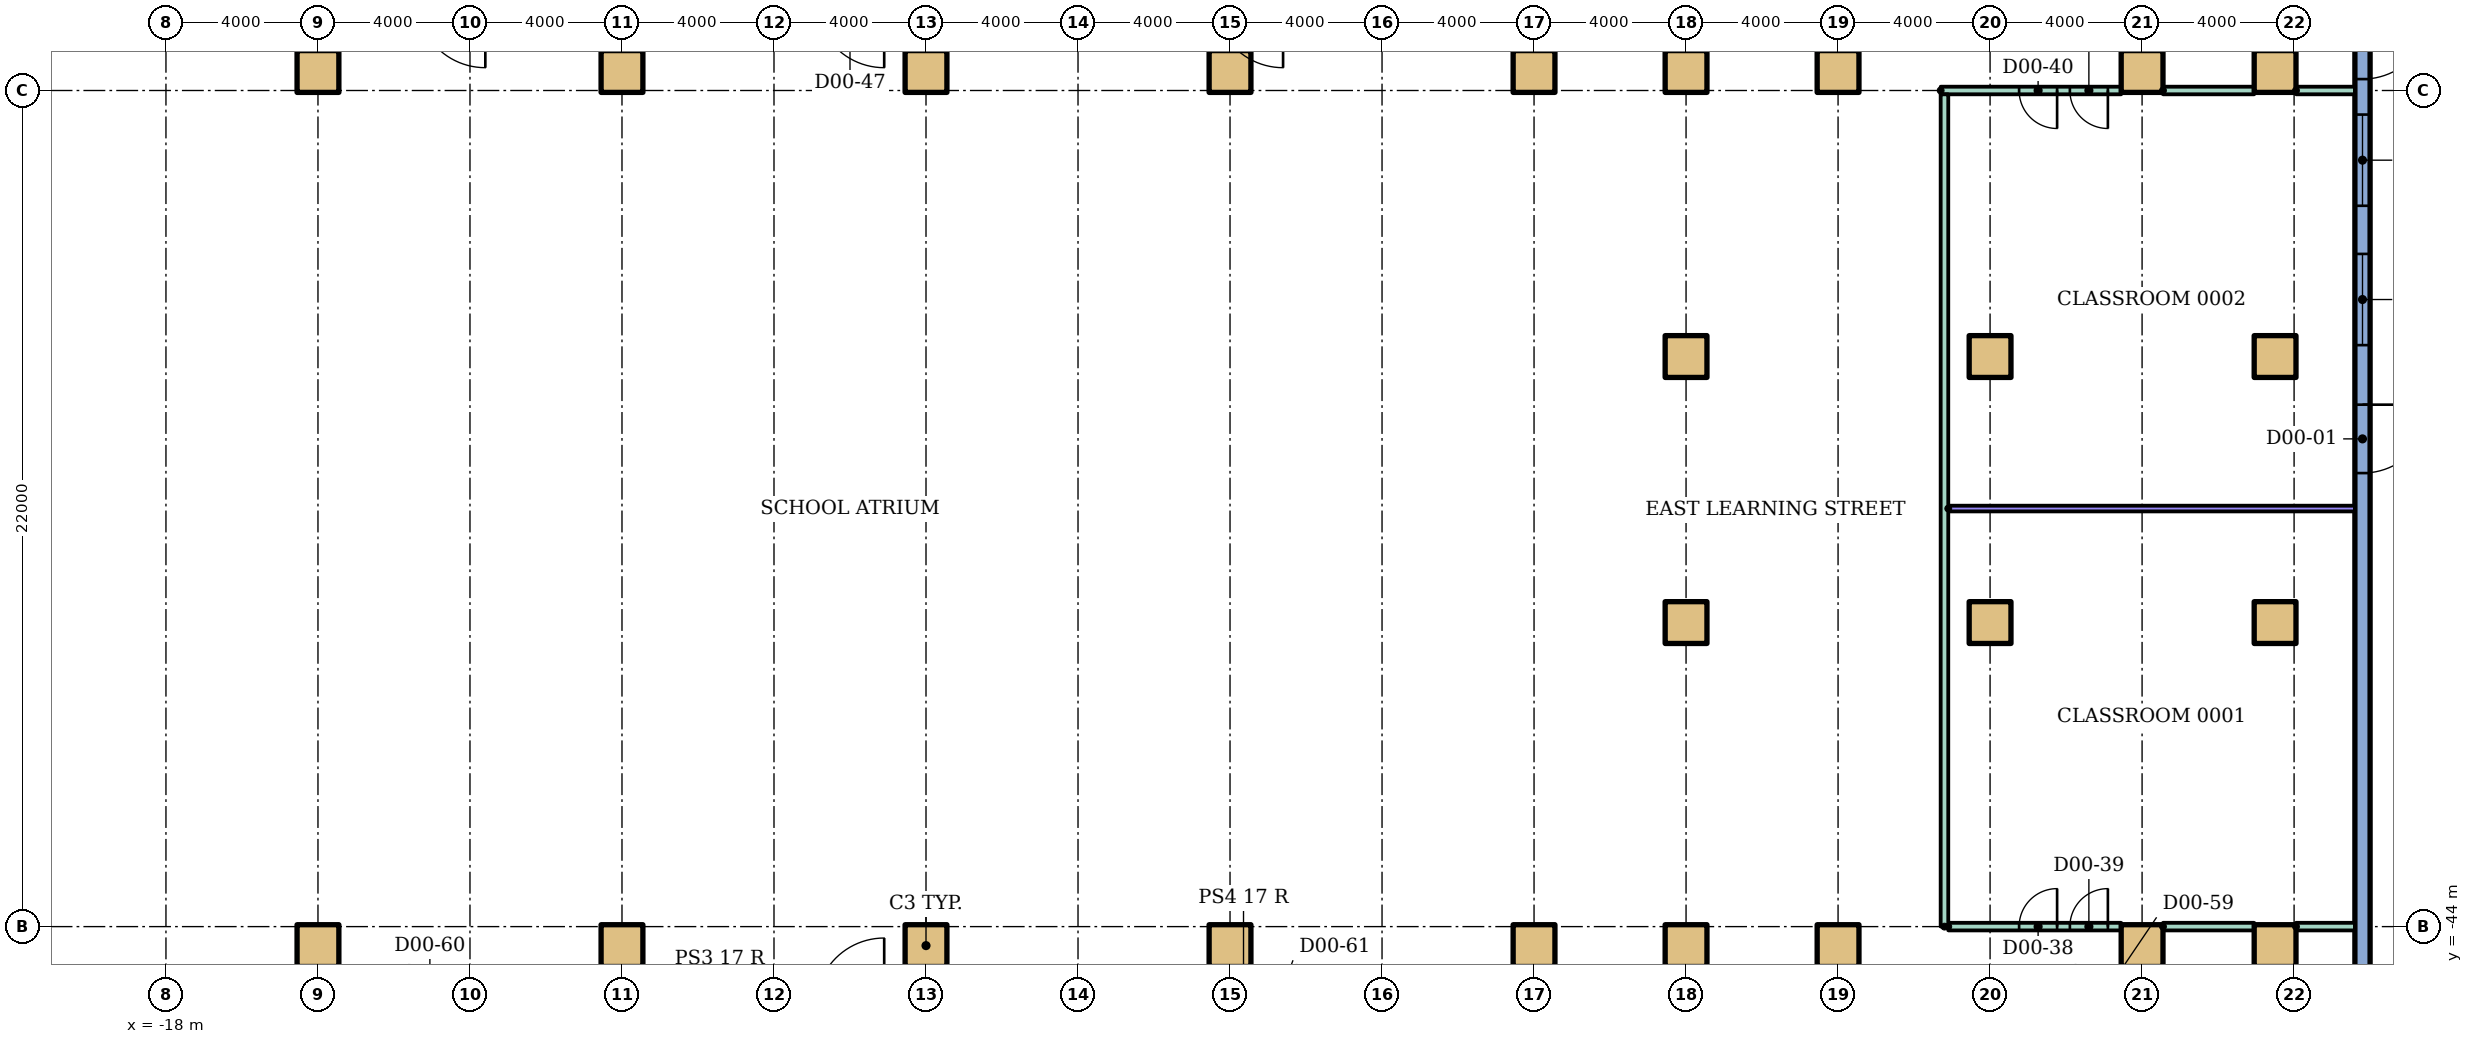
"""IFC4 building model, lengths in metres.
Left out: names, types, materials, properties, quantities, classifications, styles, units other than length and angle.
Written with IfcOpenShell. Run it as: python <this file> out.ifc"""

import sys

from ifc_helpers import new_model, si_unit, direction, frame, frame_2d, origin, origin_2d, place, context, subcontext, project, spatial, rectangle, extrude, element, fill, save


model = new_model("IFC4")
c1 = context("Model", 3, precision=1e-05, world=origin(), true_north=direction((0.0, 1.0)))
c2 = subcontext(c1, "Body", "Model", "MODEL_VIEW")
j1 = project(units=[si_unit("LENGTHUNIT", "METRE"), si_unit("PLANEANGLEUNIT", "RADIAN")], contexts=[c1])
p1 = place(None, origin())
s1 = spatial("IfcSite", under=j1, at=p1, CompositionType="ELEMENT")
p2 = place(p1, origin())
s2 = spatial("IfcBuilding", under=s1, at=p2, CompositionType="ELEMENT")
p3 = place(p2, origin())
s3 = spatial("IfcBuildingStorey", under=s2, at=p3, CompositionType="ELEMENT", Elevation=0.0)
for number, where in (
    (1, (-14.0, -44.5, 0.0)),
    (2, (-6.0, -44.5, 0.0)),
    (3, (2.0, -44.5, 0.0)),
    (4, (10.0, -44.5, 0.0)),
    (5, (18.0, -44.5, 0.0)),
    (6, (22.0, -44.5, 0.0)),
    (7, (26.0, -44.5, 0.0)),
    (8, (34.0, -44.5, 0.0)),
    (9, (37.5, -44.5, 0.0)),
    (10, (22.0, -36.0, 0.0)),
    (11, (30.0, -36.0, 0.0)),
    (12, (37.5, -36.0, 0.0)),
    (13, (22.0, -29.0, 0.0)),
    (14, (30.0, -29.0, 0.0)),
    (15, (37.5, -29.0, 0.0)),
    (16, (-14.0, -21.5, 0.0)),
    (17, (-6.0, -21.5, 0.0)),
    (18, (2.0, -21.5, 0.0)),
    (19, (10.0, -21.5, 0.0)),
    (20, (18.0, -21.5, 0.0)),
    (21, (22.0, -21.5, 0.0)),
    (22, (26.0, -21.5, 0.0)),
    (23, (34.0, -21.5, 0.0)),
    (24, (37.5, -21.5, 0.0)),
):
    element("IfcColumn", number, at=place(p3, frame(where)), inside=s3, PredefinedType="COLUMN", context=c2, shape_type="SweptSolid", body=[
        extrude(rectangle(XDim=1.1, YDim=1.1, at=origin_2d()), origin(), (0.0, 0.0, 1.0), 6.0),
    ])
p4 = place(p3, frame((39.8, -50.0, 0.0), z_axis=(0.0, 0.0, 1.0), x_axis=(0.0, 1.0, 0.0)))
e25 = element("IfcWall", 25, at=p4, inside=s3, PredefinedType="STANDARD", context=c2, shape_type="SweptSolid", body=[
    extrude(rectangle(XDim=70.0, YDim=0.4, at=frame_2d((35.0, 0.0))), origin(), (0.0, 0.0, 1.0), 5.7),
])
p5 = place(p4, frame((17.933, 0.0, 0.0)))
e26 = element("IfcOpeningElement", 26, at=p5, cuts=e25, PredefinedType="OPENING", context=c2, shape_type="SweptSolid", body=[
    extrude(rectangle(XDim=1.8, YDim=2.4, at=frame_2d((0.9, 1.2))), frame((0.0, 0.21, 0.0), z_axis=(0.0, -1.0, 0.0), x_axis=(1.0, 0.0, 0.0)), (0.0, 0.0, 1.0), 0.42),
])
p6 = place(p4, frame((0.75, 0.0, 0.9)))
e27 = element("IfcOpeningElement", 27, at=p6, cuts=e25, PredefinedType="OPENING", context=c2, shape_type="SweptSolid", body=[
    extrude(rectangle(XDim=2.4, YDim=2.4, at=frame_2d((1.2, 1.2))), frame((0.0, 0.21, 0.0), z_axis=(0.0, -1.0, 0.0), x_axis=(1.0, 0.0, 0.0)), (0.0, 0.0, 1.0), 0.42),
])
p7 = place(p4, frame((21.3, 0.0, 0.9)))
e28 = element("IfcOpeningElement", 28, at=p7, cuts=e25, PredefinedType="OPENING", context=c2, shape_type="SweptSolid", body=[
    extrude(rectangle(XDim=2.4, YDim=2.4, at=frame_2d((1.2, 1.2))), frame((0.0, 0.21, 0.0), z_axis=(0.0, -1.0, 0.0), x_axis=(1.0, 0.0, 0.0)), (0.0, 0.0, 1.0), 0.42),
])
p8 = place(p4, frame((24.967, 0.0, 0.9)))
e29 = element("IfcOpeningElement", 29, at=p8, cuts=e25, PredefinedType="OPENING", context=c2, shape_type="SweptSolid", body=[
    extrude(rectangle(XDim=2.4, YDim=2.4, at=frame_2d((1.2, 1.2))), frame((0.0, 0.21, 0.0), z_axis=(0.0, -1.0, 0.0), x_axis=(1.0, 0.0, 0.0)), (0.0, 0.0, 1.0), 0.42),
])
p9 = place(p4, frame((32.988, 0.0, 0.9)))
e30 = element("IfcOpeningElement", 30, at=p9, cuts=e25, PredefinedType="OPENING", context=c2, shape_type="SweptSolid", body=[
    extrude(rectangle(XDim=2.4, YDim=2.4, at=frame_2d((1.2, 1.2))), frame((0.0, 0.21, 0.0), z_axis=(0.0, -1.0, 0.0), x_axis=(1.0, 0.0, 0.0)), (0.0, 0.0, 1.0), 0.42),
])
p10 = place(p4, frame((45.363, 0.0, 0.9)))
e31 = element("IfcOpeningElement", 31, at=p10, cuts=e25, PredefinedType="OPENING", context=c2, shape_type="SweptSolid", body=[
    extrude(rectangle(XDim=2.4, YDim=2.4, at=frame_2d((1.2, 1.2))), frame((0.0, 0.21, 0.0), z_axis=(0.0, -1.0, 0.0), x_axis=(1.0, 0.0, 0.0)), (0.0, 0.0, 1.0), 0.42),
])
p11 = place(p4, frame((49.488, 0.0, 0.9)))
e32 = element("IfcOpeningElement", 32, at=p11, cuts=e25, PredefinedType="OPENING", context=c2, shape_type="SweptSolid", body=[
    extrude(rectangle(XDim=2.4, YDim=2.4, at=frame_2d((1.2, 1.2))), frame((0.0, 0.21, 0.0), z_axis=(0.0, -1.0, 0.0), x_axis=(1.0, 0.0, 0.0)), (0.0, 0.0, 1.0), 0.42),
])
p12 = place(p4, frame((53.613, 0.0, 0.9)))
e33 = element("IfcOpeningElement", 33, at=p12, cuts=e25, PredefinedType="OPENING", context=c2, shape_type="SweptSolid", body=[
    extrude(rectangle(XDim=2.4, YDim=2.4, at=frame_2d((1.2, 1.2))), frame((0.0, 0.21, 0.0), z_axis=(0.0, -1.0, 0.0), x_axis=(1.0, 0.0, 0.0)), (0.0, 0.0, 1.0), 0.42),
])
p13 = place(p4, frame((57.738, 0.0, 0.9)))
e34 = element("IfcOpeningElement", 34, at=p13, cuts=e25, PredefinedType="OPENING", context=c2, shape_type="SweptSolid", body=[
    extrude(rectangle(XDim=2.4, YDim=2.4, at=frame_2d((1.2, 1.2))), frame((0.0, 0.21, 0.0), z_axis=(0.0, -1.0, 0.0), x_axis=(1.0, 0.0, 0.0)), (0.0, 0.0, 1.0), 0.42),
])
p14 = place(p4, frame((62.05, 0.0, 0.9)))
e35 = element("IfcOpeningElement", 35, at=p14, cuts=e25, PredefinedType="OPENING", context=c2, shape_type="SweptSolid", body=[
    extrude(rectangle(XDim=2.4, YDim=2.4, at=frame_2d((1.2, 1.2))), frame((0.0, 0.21, 0.0), z_axis=(0.0, -1.0, 0.0), x_axis=(1.0, 0.0, 0.0)), (0.0, 0.0, 1.0), 0.42),
])
p15 = place(p4, frame((66.55, 0.0, 0.9)))
e36 = element("IfcOpeningElement", 36, at=p15, cuts=e25, PredefinedType="OPENING", context=c2, shape_type="SweptSolid", body=[
    extrude(rectangle(XDim=2.4, YDim=2.4, at=frame_2d((1.2, 1.2))), frame((0.0, 0.21, 0.0), z_axis=(0.0, -1.0, 0.0), x_axis=(1.0, 0.0, 0.0)), (0.0, 0.0, 1.0), 0.42),
])
p16 = place(p4, frame((39.5, 0.0, 0.0)))
e37 = element("IfcOpeningElement", 37, at=p16, cuts=e25, PredefinedType="OPENING", context=c2, shape_type="SweptSolid", body=[
    extrude(rectangle(XDim=1.8, YDim=2.1, at=frame_2d((0.9, 1.05))), frame((0.0, 0.21, 0.0), z_axis=(0.0, -1.0, 0.0), x_axis=(1.0, 0.0, 0.0)), (0.0, 0.0, 1.0), 0.42),
])
p17 = place(p4, frame((28.3, 0.0, 0.0)))
e38 = element("IfcOpeningElement", 38, at=p17, cuts=e25, PredefinedType="OPENING", context=c2, shape_type="SweptSolid", body=[
    extrude(rectangle(XDim=1.8, YDim=2.1, at=frame_2d((0.9, 1.05))), frame((0.0, 0.21, 0.0), z_axis=(0.0, -1.0, 0.0), x_axis=(1.0, 0.0, 0.0)), (0.0, 0.0, 1.0), 0.42),
])
p18 = place(p3, frame((28.9, -44.0, 0.0)))
e39 = element("IfcWall", 39, at=p18, inside=s3, PredefinedType="PARTITIONING", context=c2, shape_type="SweptSolid", body=[
    extrude(rectangle(XDim=4.55, YDim=0.2, at=frame_2d((2.275, 0.0))), origin(), (0.0, 0.0, 1.0), 5.7),
])
p19 = place(p18, frame((1.864, 0.0, 0.0)))
e40 = element("IfcOpeningElement", 40, at=p19, cuts=e39, PredefinedType="OPENING", context=c2, shape_type="SweptSolid", body=[
    extrude(rectangle(XDim=1.0, YDim=2.1, at=frame_2d((0.5, 1.05))), frame((0.0, 0.11, 0.0), z_axis=(0.0, -1.0, 0.0), x_axis=(1.0, 0.0, 0.0)), (0.0, 0.0, 1.0), 0.22),
])
p20 = place(p18, frame((3.2, 0.0, 0.0)))
e41 = element("IfcOpeningElement", 41, at=p20, cuts=e39, PredefinedType="OPENING", context=c2, shape_type="SweptSolid", body=[
    extrude(rectangle(XDim=1.0, YDim=2.1, at=frame_2d((0.5, 1.05))), frame((0.0, 0.11, 0.0), z_axis=(0.0, -1.0, 0.0), x_axis=(1.0, 0.0, 0.0)), (0.0, 0.0, 1.0), 0.22),
])
p21 = place(p3, frame((34.55, -44.0, 0.0)))
e42 = element("IfcWall", 42, at=p21, inside=s3, PredefinedType="PARTITIONING", context=c2, shape_type="SweptSolid", body=[
    extrude(rectangle(XDim=2.4, YDim=0.2, at=frame_2d((1.2, 0.0))), origin(), (0.0, 0.0, 1.0), 5.7),
])
p22 = place(p3, frame((38.05, -44.0, 0.0)))
e43 = element("IfcWall", 43, at=p22, inside=s3, PredefinedType="PARTITIONING", context=c2, shape_type="SweptSolid", body=[
    extrude(rectangle(XDim=1.55, YDim=0.2, at=frame_2d((0.775, 0.0))), origin(), (0.0, 0.0, 1.0), 5.7),
])
p23 = place(p3, frame((28.9, -33.0, 0.0)))
e44 = element("IfcWall", 44, at=p23, inside=s3, PredefinedType="PARTITIONING", context=c2, shape_type="SweptSolid", body=[
    extrude(rectangle(XDim=10.7, YDim=0.15, at=frame_2d((5.35, 0.0))), origin(), (0.0, 0.0, 1.0), 5.7),
])
p24 = place(p3, frame((28.7, -22.0, 0.0)))
e45 = element("IfcWall", 45, at=p24, inside=s3, PredefinedType="PARTITIONING", context=c2, shape_type="SweptSolid", body=[
    extrude(rectangle(XDim=4.75, YDim=0.2, at=frame_2d((2.375, 0.0))), origin(), (0.0, 0.0, 1.0), 5.7),
])
p25 = place(p24, frame((2.064, 0.0, 0.0)))
e46 = element("IfcOpeningElement", 46, at=p25, cuts=e45, PredefinedType="OPENING", context=c2, shape_type="SweptSolid", body=[
    extrude(rectangle(XDim=1.0, YDim=2.1, at=frame_2d((0.5, 1.05))), frame((0.0, 0.11, 0.0), z_axis=(0.0, -1.0, 0.0), x_axis=(1.0, 0.0, 0.0)), (0.0, 0.0, 1.0), 0.22),
])
p26 = place(p24, frame((3.4, 0.0, 0.0)))
e47 = element("IfcOpeningElement", 47, at=p26, cuts=e45, PredefinedType="OPENING", context=c2, shape_type="SweptSolid", body=[
    extrude(rectangle(XDim=1.0, YDim=2.1, at=frame_2d((0.5, 1.05))), frame((0.0, 0.11, 0.0), z_axis=(0.0, -1.0, 0.0), x_axis=(1.0, 0.0, 0.0)), (0.0, 0.0, 1.0), 0.22),
])
p27 = place(p3, frame((34.55, -22.0, 0.0)))
e48 = element("IfcWall", 48, at=p27, inside=s3, PredefinedType="PARTITIONING", context=c2, shape_type="SweptSolid", body=[
    extrude(rectangle(XDim=2.4, YDim=0.2, at=frame_2d((1.2, 0.0))), origin(), (0.0, 0.0, 1.0), 5.7),
])
p28 = place(p3, frame((38.05, -22.0, 0.0)))
e49 = element("IfcWall", 49, at=p28, inside=s3, PredefinedType="PARTITIONING", context=c2, shape_type="SweptSolid", body=[
    extrude(rectangle(XDim=1.55, YDim=0.2, at=frame_2d((0.775, 0.0))), origin(), (0.0, 0.0, 1.0), 5.7),
])
p29 = place(p3, frame((28.8, -44.0, 0.0), z_axis=(0.0, 0.0, 1.0), x_axis=(0.0, 1.0, 0.0)))
e50 = element("IfcWall", 50, at=p29, inside=s3, PredefinedType="PARTITIONING", context=c2, shape_type="SweptSolid", body=[
    extrude(rectangle(XDim=21.9, YDim=0.2, at=frame_2d((10.95, 0.0))), origin(), (0.0, 0.0, 1.0), 5.7),
])
p30 = place(p5, frame((1.8, 0.0, 0.0), z_axis=(0.0, 0.0, 1.0), x_axis=(-1.0, 0.0, 0.0)))
e51 = element("IfcDoor", 51, at=p30, inside=s3, OperationType="DOUBLE_DOOR_SINGLE_SWING", PredefinedType="DOOR", context=c2, shape_type="SweptSolid", body=[
    extrude(rectangle(XDim=1.8, YDim=2.4, at=frame_2d((0.9, 1.2))), frame((0.0, 0.025, 0.0), z_axis=(0.0, -1.0, 0.0), x_axis=(1.0, 0.0, 0.0)), (0.0, 0.0, 1.0), 0.05),
])
fill(e26, e51)
p31 = place(p7, origin())
e52 = element("IfcWindow", 52, at=p31, inside=s3, PartitioningType="SINGLE_PANEL", PredefinedType="WINDOW", context=c2, shape_type="SweptSolid", body=[
    extrude(rectangle(XDim=2.4, YDim=2.4, at=frame_2d((1.2, 1.2))), frame((0.0, 0.03, 0.0), z_axis=(0.0, -1.0, 0.0), x_axis=(1.0, 0.0, 0.0)), (0.0, 0.0, 1.0), 0.06),
])
fill(e28, e52)
p32 = place(p8, origin())
e53 = element("IfcWindow", 53, at=p32, inside=s3, PartitioningType="SINGLE_PANEL", PredefinedType="WINDOW", context=c2, shape_type="SweptSolid", body=[
    extrude(rectangle(XDim=2.4, YDim=2.4, at=frame_2d((1.2, 1.2))), frame((0.0, 0.03, 0.0), z_axis=(0.0, -1.0, 0.0), x_axis=(1.0, 0.0, 0.0)), (0.0, 0.0, 1.0), 0.06),
])
fill(e29, e53)
p33 = place(p19, origin())
e54 = element("IfcDoor", 54, at=p33, inside=s3, OperationType="SINGLE_SWING_RIGHT", PredefinedType="DOOR", context=c2, shape_type="SweptSolid", body=[
    extrude(rectangle(XDim=1.0, YDim=2.1, at=frame_2d((0.5, 1.05))), frame((0.0, 0.025, 0.0), z_axis=(0.0, -1.0, 0.0), x_axis=(1.0, 0.0, 0.0)), (0.0, 0.0, 1.0), 0.05),
])
fill(e40, e54)
p34 = place(p20, origin())
e55 = element("IfcDoor", 55, at=p34, inside=s3, OperationType="SINGLE_SWING_RIGHT", PredefinedType="DOOR", context=c2, shape_type="SweptSolid", body=[
    extrude(rectangle(XDim=1.0, YDim=2.1, at=frame_2d((0.5, 1.05))), frame((0.0, 0.025, 0.0), z_axis=(0.0, -1.0, 0.0), x_axis=(1.0, 0.0, 0.0)), (0.0, 0.0, 1.0), 0.05),
])
fill(e41, e55)
p35 = place(p25, frame((1.0, 0.0, 0.0), z_axis=(0.0, 0.0, 1.0), x_axis=(-1.0, 0.0, 0.0)))
e56 = element("IfcDoor", 56, at=p35, inside=s3, OperationType="SINGLE_SWING_RIGHT", PredefinedType="DOOR", context=c2, shape_type="SweptSolid", body=[
    extrude(rectangle(XDim=1.0, YDim=2.1, at=frame_2d((0.5, 1.05))), frame((0.0, 0.025, 0.0), z_axis=(0.0, -1.0, 0.0), x_axis=(1.0, 0.0, 0.0)), (0.0, 0.0, 1.0), 0.05),
])
fill(e46, e56)
p36 = place(p26, frame((1.0, 0.0, 0.0), z_axis=(0.0, 0.0, 1.0), x_axis=(-1.0, 0.0, 0.0)))
e57 = element("IfcDoor", 57, at=p36, inside=s3, OperationType="SINGLE_SWING_RIGHT", PredefinedType="DOOR", context=c2, shape_type="SweptSolid", body=[
    extrude(rectangle(XDim=1.0, YDim=2.1, at=frame_2d((0.5, 1.05))), frame((0.0, 0.025, 0.0), z_axis=(0.0, -1.0, 0.0), x_axis=(1.0, 0.0, 0.0)), (0.0, 0.0, 1.0), 0.05),
])
fill(e47, e57)
p37 = place(p17, frame((1.8, 0.0, 0.0), z_axis=(0.0, 0.0, 1.0), x_axis=(-1.0, 0.0, 0.0)))
e58 = element("IfcDoor", 58, at=p37, inside=s3, OperationType="DOUBLE_DOOR_SINGLE_SWING", PredefinedType="DOOR", context=c2, shape_type="SweptSolid", body=[
    extrude(rectangle(XDim=1.8, YDim=2.1, at=frame_2d((0.9, 1.05))), frame((0.0, 0.025, 0.0), z_axis=(0.0, -1.0, 0.0), x_axis=(1.0, 0.0, 0.0)), (0.0, 0.0, 1.0), 0.05),
])
fill(e38, e58)
save(model, sys.argv[1])
